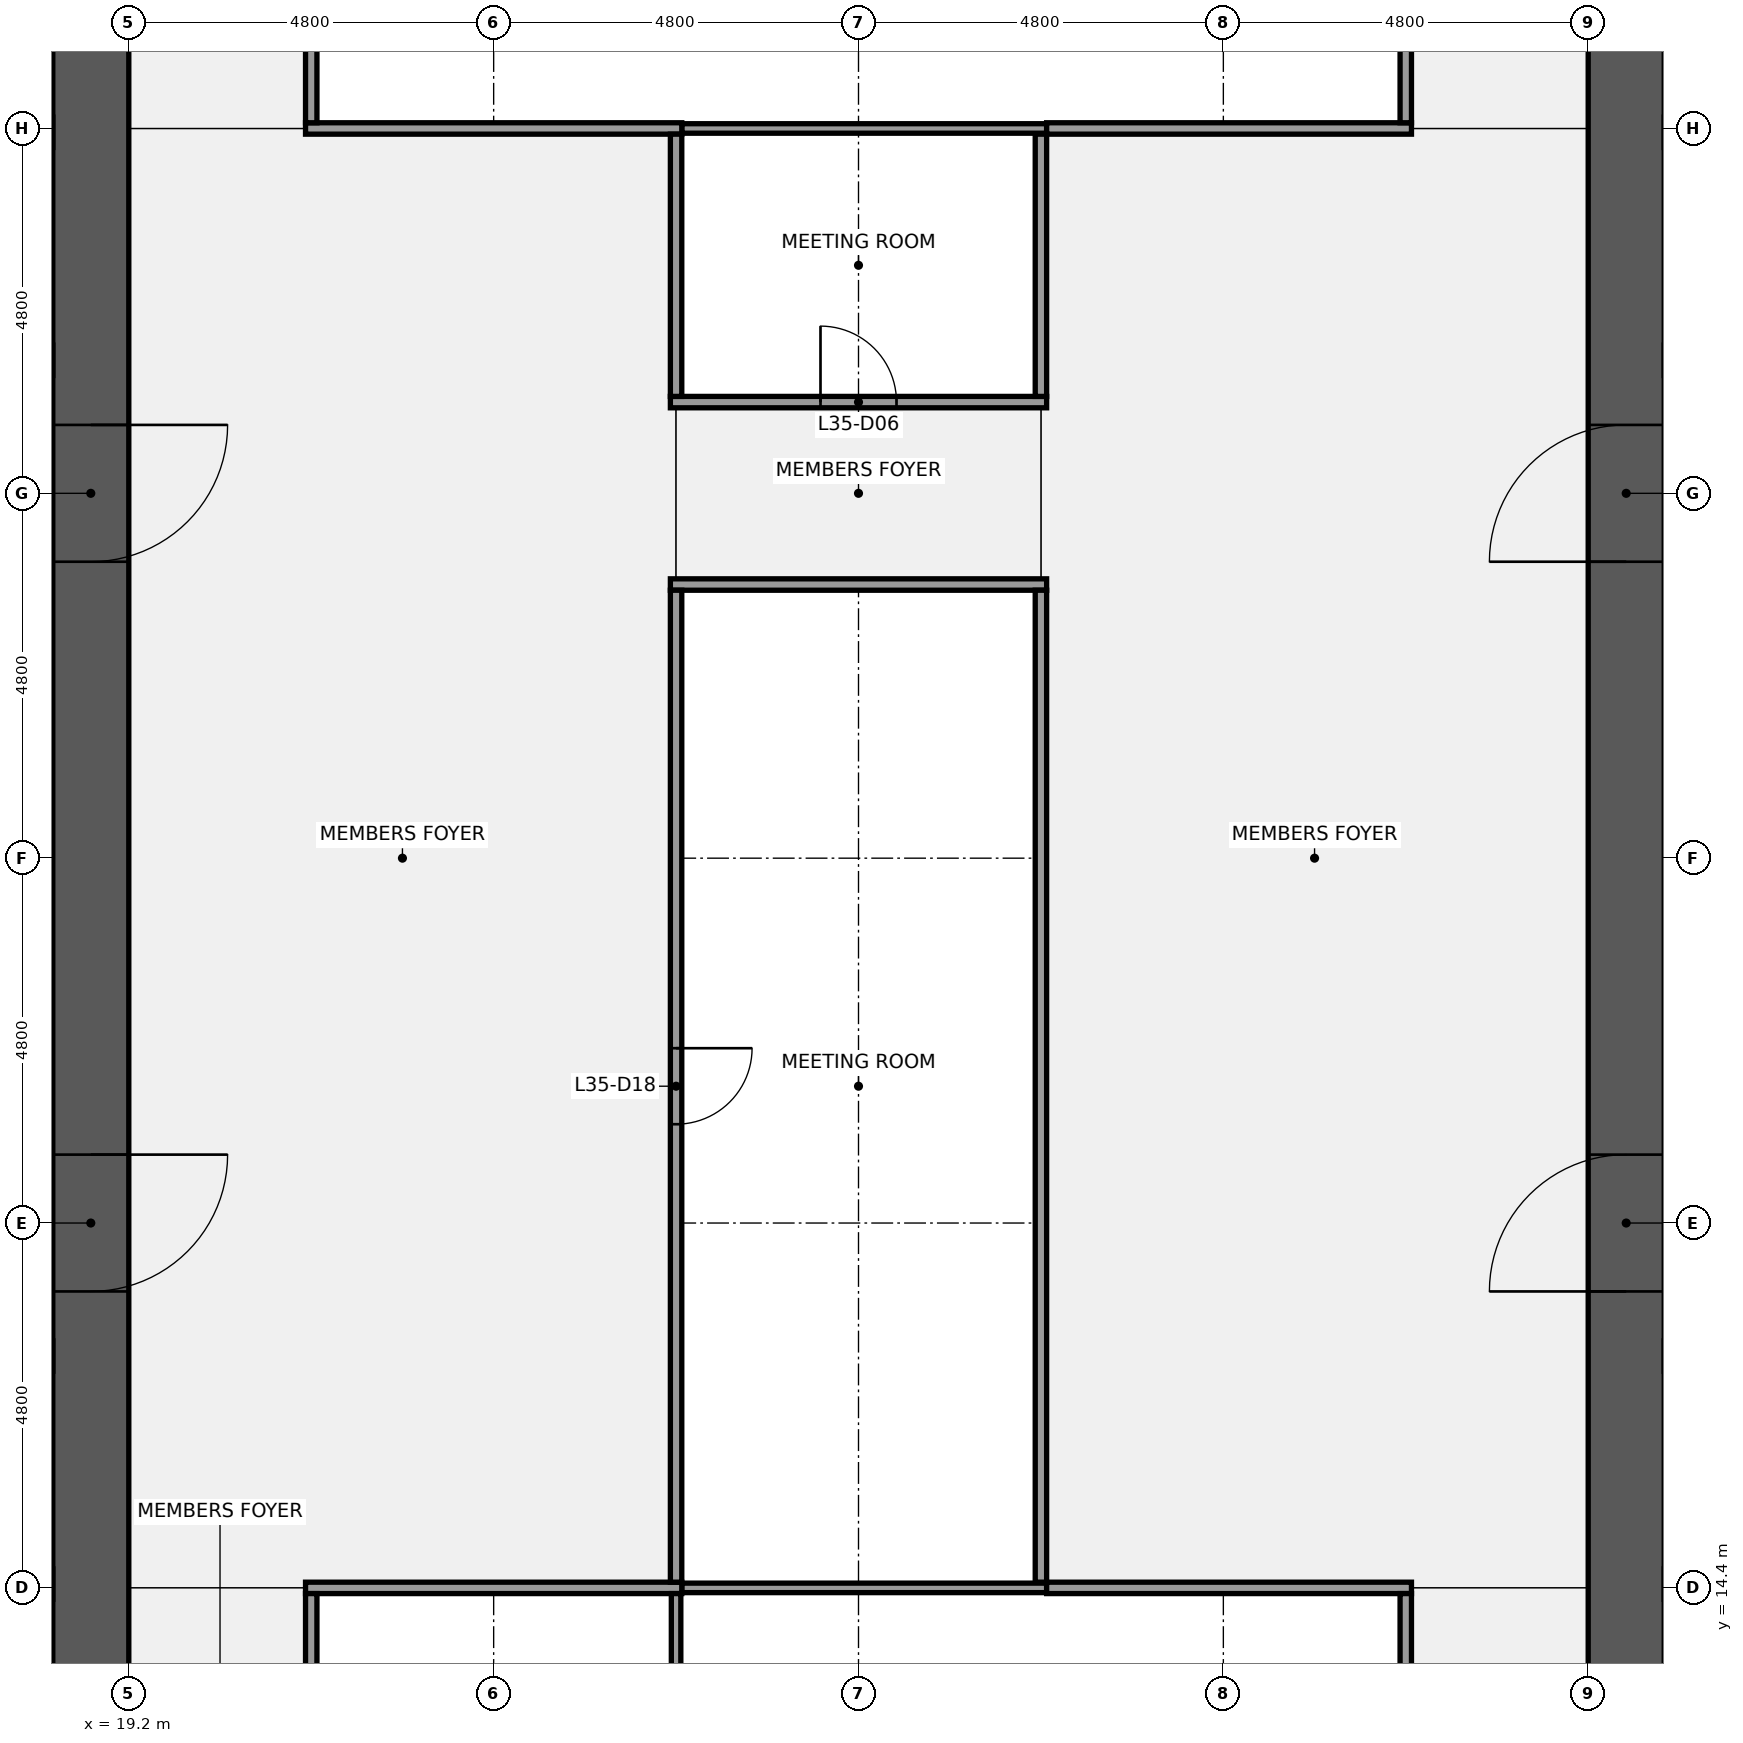
"""IFC4 building model, lengths in metres.
Left out: names, types, materials, properties, quantities, classifications, styles, units other than length and angle.
Written with IfcOpenShell. Run it as: python <this file> out.ifc"""

import sys

from ifc_helpers import new_model, si_unit, direction, frame, frame_2d, origin, place, context, subcontext, project, spatial, rectangle, extrude, element, fill, save


model = new_model("IFC4")
c1 = context("Model", 3, precision=1e-05, world=origin(), true_north=direction((0.0, 1.0)))
c2 = subcontext(c1, "Body", "Model", "MODEL_VIEW")
j1 = project(units=[si_unit("LENGTHUNIT", "METRE"), si_unit("PLANEANGLEUNIT", "RADIAN")], contexts=[c1])
p1 = place(None, origin())
s1 = spatial("IfcSite", under=j1, at=p1, CompositionType="ELEMENT")
p2 = place(p1, origin())
s2 = spatial("IfcBuilding", under=s1, at=p2, CompositionType="ELEMENT")
p3 = place(p2, frame((0.0, 0.0, 160.1)))
s3 = spatial("IfcBuildingStorey", under=s2, at=p3, CompositionType="ELEMENT", Elevation=160.1)
p4 = place(p3, frame((18.7, 38.4, 0.0), z_axis=(0.0, 0.0, 1.0), x_axis=(0.0, -1.0, 0.0)))
e1 = element("IfcWall", 1, at=p4, inside=s3, PredefinedType="SHEAR", context=c2, shape_type="SweptSolid", body=[
    extrude(rectangle(XDim=28.8, YDim=1.0, at=frame_2d((14.4, 0.0))), origin(), (0.0, 0.0, 1.0), 3.84),
])
p5 = place(p4, frame((18.3, 0.0, 0.0)))
e2 = element("IfcOpeningElement", 2, at=p5, cuts=e1, PredefinedType="OPENING", context=c2, shape_type="SweptSolid", body=[
    extrude(rectangle(XDim=1.8, YDim=2.1, at=frame_2d((0.9, 1.05))), frame((0.0, 0.51, 0.0), z_axis=(0.0, -1.0, 0.0), x_axis=(1.0, 0.0, 0.0)), (0.0, 0.0, 1.0), 1.02),
])
p6 = place(p4, frame((8.7, 0.0, 0.0)))
e3 = element("IfcOpeningElement", 3, at=p6, cuts=e1, PredefinedType="OPENING", context=c2, shape_type="SweptSolid", body=[
    extrude(rectangle(XDim=1.8, YDim=2.1, at=frame_2d((0.9, 1.05))), frame((0.0, 0.51, 0.0), z_axis=(0.0, -1.0, 0.0), x_axis=(1.0, 0.0, 0.0)), (0.0, 0.0, 1.0), 1.02),
])
p7 = place(p3, frame((1.0, 14.45, 0.0), z_axis=(0.0, 0.0, 1.0), x_axis=(1.0, 0.0, 0.0)))
e4 = element("IfcWall", 4, at=p7, inside=s3, PredefinedType="SHEAR", context=c2, shape_type="SweptSolid", body=[
    extrude(rectangle(XDim=17.2, YDim=0.4, at=frame_2d((8.6, 0.0))), origin(), (0.0, 0.0, 1.0), 3.84),
])
p8 = place(p3, frame((1.0, 17.45, 0.0), z_axis=(0.0, 0.0, 1.0), x_axis=(1.0, 0.0, 0.0)))
e5 = element("IfcWall", 5, at=p8, inside=s3, PredefinedType="SHEAR", context=c2, shape_type="SweptSolid", body=[
    extrude(rectangle(XDim=17.2, YDim=0.4, at=frame_2d((8.6, 0.0))), origin(), (0.0, 0.0, 1.0), 3.84),
])
p9 = place(p8, frame((0.762, 0.0, 0.0)))
e6 = element("IfcOpeningElement", 6, at=p9, cuts=e5, PredefinedType="OPENING", context=c2, shape_type="SweptSolid", body=[
    extrude(rectangle(XDim=1.0, YDim=2.1, at=frame_2d((0.5, 1.05))), frame((0.0, 0.21, 0.0), z_axis=(0.0, -1.0, 0.0), x_axis=(1.0, 0.0, 0.0)), (0.0, 0.0, 1.0), 0.42),
])
p10 = place(p8, frame((3.6, 0.0, 0.0)))
e7 = element("IfcOpeningElement", 7, at=p10, cuts=e5, PredefinedType="OPENING", context=c2, shape_type="SweptSolid", body=[
    extrude(rectangle(XDim=1.0, YDim=2.1, at=frame_2d((0.5, 1.05))), frame((0.0, 0.21, 0.0), z_axis=(0.0, -1.0, 0.0), x_axis=(1.0, 0.0, 0.0)), (0.0, 0.0, 1.0), 0.42),
])
p11 = place(p8, frame((6.6, 0.0, 0.0)))
e8 = element("IfcOpeningElement", 8, at=p11, cuts=e5, PredefinedType="OPENING", context=c2, shape_type="SweptSolid", body=[
    extrude(rectangle(XDim=1.0, YDim=2.1, at=frame_2d((0.5, 1.05))), frame((0.0, 0.21, 0.0), z_axis=(0.0, -1.0, 0.0), x_axis=(1.0, 0.0, 0.0)), (0.0, 0.0, 1.0), 0.42),
])
p12 = place(p8, frame((11.1, 0.0, 0.0)))
e9 = element("IfcOpeningElement", 9, at=p12, cuts=e5, PredefinedType="OPENING", context=c2, shape_type="SweptSolid", body=[
    extrude(rectangle(XDim=1.0, YDim=2.1, at=frame_2d((0.5, 1.05))), frame((0.0, 0.21, 0.0), z_axis=(0.0, -1.0, 0.0), x_axis=(1.0, 0.0, 0.0)), (0.0, 0.0, 1.0), 0.42),
])
p13 = place(p8, frame((15.438, 0.0, 0.0)))
e10 = element("IfcOpeningElement", 10, at=p13, cuts=e5, PredefinedType="OPENING", context=c2, shape_type="SweptSolid", body=[
    extrude(rectangle(XDim=1.0, YDim=2.1, at=frame_2d((0.5, 1.05))), frame((0.0, 0.21, 0.0), z_axis=(0.0, -1.0, 0.0), x_axis=(1.0, 0.0, 0.0)), (0.0, 0.0, 1.0), 0.42),
])
p14 = place(p3, frame((1.0, 30.55, 0.0), z_axis=(0.0, 0.0, 1.0), x_axis=(1.0, 0.0, 0.0)))
e11 = element("IfcWall", 11, at=p14, inside=s3, PredefinedType="SHEAR", context=c2, shape_type="SweptSolid", body=[
    extrude(rectangle(XDim=17.2, YDim=0.4, at=frame_2d((8.6, 0.0))), origin(), (0.0, 0.0, 1.0), 3.84),
])
p15 = place(p14, frame((0.762, 0.0, 0.0)))
e12 = element("IfcOpeningElement", 12, at=p15, cuts=e11, PredefinedType="OPENING", context=c2, shape_type="SweptSolid", body=[
    extrude(rectangle(XDim=1.0, YDim=2.1, at=frame_2d((0.5, 1.05))), frame((0.0, 0.21, 0.0), z_axis=(0.0, -1.0, 0.0), x_axis=(1.0, 0.0, 0.0)), (0.0, 0.0, 1.0), 0.42),
])
p16 = place(p14, frame((4.2, 0.0, 0.0)))
e13 = element("IfcOpeningElement", 13, at=p16, cuts=e11, PredefinedType="OPENING", context=c2, shape_type="SweptSolid", body=[
    extrude(rectangle(XDim=1.0, YDim=2.1, at=frame_2d((0.5, 1.05))), frame((0.0, 0.21, 0.0), z_axis=(0.0, -1.0, 0.0), x_axis=(1.0, 0.0, 0.0)), (0.0, 0.0, 1.0), 0.42),
])
p17 = place(p14, frame((8.4, 0.0, 0.0)))
e14 = element("IfcOpeningElement", 14, at=p17, cuts=e11, PredefinedType="OPENING", context=c2, shape_type="SweptSolid", body=[
    extrude(rectangle(XDim=1.0, YDim=2.1, at=frame_2d((0.5, 1.05))), frame((0.0, 0.21, 0.0), z_axis=(0.0, -1.0, 0.0), x_axis=(1.0, 0.0, 0.0)), (0.0, 0.0, 1.0), 0.42),
])
p18 = place(p14, frame((13.637, 0.0, 0.0)))
e15 = element("IfcOpeningElement", 15, at=p18, cuts=e11, PredefinedType="OPENING", context=c2, shape_type="SweptSolid", body=[
    extrude(rectangle(XDim=1.0, YDim=2.1, at=frame_2d((0.5, 1.05))), frame((0.0, 0.21, 0.0), z_axis=(0.0, -1.0, 0.0), x_axis=(1.0, 0.0, 0.0)), (0.0, 0.0, 1.0), 0.42),
])
p19 = place(p3, frame((1.0, 33.55, 0.0), z_axis=(0.0, 0.0, 1.0), x_axis=(1.0, 0.0, 0.0)))
e16 = element("IfcWall", 16, at=p19, inside=s3, PredefinedType="SHEAR", context=c2, shape_type="SweptSolid", body=[
    extrude(rectangle(XDim=17.2, YDim=0.4, at=frame_2d((8.6, 0.0))), origin(), (0.0, 0.0, 1.0), 3.84),
])
p20 = place(p3, frame((38.9, 9.6, 0.0), z_axis=(0.0, 0.0, 1.0), x_axis=(0.0, 1.0, 0.0)))
e17 = element("IfcWall", 17, at=p20, inside=s3, PredefinedType="SHEAR", context=c2, shape_type="SweptSolid", body=[
    extrude(rectangle(XDim=28.8, YDim=1.0, at=frame_2d((14.4, 0.0))), origin(), (0.0, 0.0, 1.0), 3.84),
])
p21 = place(p20, frame((8.7, 0.0, 0.0)))
e18 = element("IfcOpeningElement", 18, at=p21, cuts=e17, PredefinedType="OPENING", context=c2, shape_type="SweptSolid", body=[
    extrude(rectangle(XDim=1.8, YDim=2.1, at=frame_2d((0.9, 1.05))), frame((0.0, 0.51, 0.0), z_axis=(0.0, -1.0, 0.0), x_axis=(1.0, 0.0, 0.0)), (0.0, 0.0, 1.0), 1.02),
])
p22 = place(p20, frame((18.3, 0.0, 0.0)))
e19 = element("IfcOpeningElement", 19, at=p22, cuts=e17, PredefinedType="OPENING", context=c2, shape_type="SweptSolid", body=[
    extrude(rectangle(XDim=1.8, YDim=2.1, at=frame_2d((0.9, 1.05))), frame((0.0, 0.51, 0.0), z_axis=(0.0, -1.0, 0.0), x_axis=(1.0, 0.0, 0.0)), (0.0, 0.0, 1.0), 1.02),
])
p23 = place(p3, frame((26.475, 14.4, 0.0), z_axis=(0.0, 0.0, 1.0), x_axis=(1.0, 0.0, 0.0)))
e20 = element("IfcWall", 20, at=p23, inside=s3, PredefinedType="PARTITIONING", context=c2, shape_type="SweptSolid", body=[
    extrude(rectangle(XDim=4.8, YDim=0.125, at=frame_2d((2.4, 0.0))), origin(), (0.0, 0.0, 1.0), 2.849),
])
p24 = place(p3, frame((21.525, 14.4, 0.0), z_axis=(0.0, 0.0, 1.0), x_axis=(1.0, 0.0, 0.0)))
e21 = element("IfcWall", 21, at=p24, inside=s3, PredefinedType="PARTITIONING", context=c2, shape_type="SweptSolid", body=[
    extrude(rectangle(XDim=4.95, YDim=0.15, at=frame_2d((2.475, 0.0))), origin(), (0.0, 0.0, 1.0), 2.849),
])
p25 = place(p3, frame((31.275, 14.4, 0.0), z_axis=(0.0, 0.0, 1.0), x_axis=(1.0, 0.0, 0.0)))
e22 = element("IfcWall", 22, at=p25, inside=s3, PredefinedType="PARTITIONING", context=c2, shape_type="SweptSolid", body=[
    extrude(rectangle(XDim=4.8, YDim=0.15, at=frame_2d((2.4, 0.0))), origin(), (0.0, 0.0, 1.0), 2.849),
])
p26 = place(p3, frame((26.325, 27.6, 0.0), z_axis=(0.0, 0.0, 1.0), x_axis=(1.0, 0.0, 0.0)))
e23 = element("IfcWall", 23, at=p26, inside=s3, PredefinedType="PARTITIONING", context=c2, shape_type="SweptSolid", body=[
    extrude(rectangle(XDim=4.95, YDim=0.15, at=frame_2d((2.475, 0.0))), origin(), (0.0, 0.0, 1.0), 2.849),
])
p27 = place(p3, frame((26.325, 30.0, 0.0), z_axis=(0.0, 0.0, 1.0), x_axis=(1.0, 0.0, 0.0)))
e24 = element("IfcWall", 24, at=p27, inside=s3, PredefinedType="PARTITIONING", context=c2, shape_type="SweptSolid", body=[
    extrude(rectangle(XDim=4.95, YDim=0.15, at=frame_2d((2.475, 0.0))), origin(), (0.0, 0.0, 1.0), 2.849),
])
p28 = place(p27, frame((1.975, 0.0, 0.0)))
e25 = element("IfcOpeningElement", 25, at=p28, cuts=e24, PredefinedType="OPENING", context=c2, shape_type="SweptSolid", body=[
    extrude(rectangle(XDim=1.0, YDim=2.1, at=frame_2d((0.5, 1.05))), frame((0.0, 0.085, 0.0), z_axis=(0.0, -1.0, 0.0), x_axis=(1.0, 0.0, 0.0)), (0.0, 0.0, 1.0), 0.17),
])
p29 = place(p3, frame((26.475, 33.6, 0.0), z_axis=(0.0, 0.0, 1.0), x_axis=(1.0, 0.0, 0.0)))
e26 = element("IfcWall", 26, at=p29, inside=s3, PredefinedType="PARTITIONING", context=c2, shape_type="SweptSolid", body=[
    extrude(rectangle(XDim=4.8, YDim=0.125, at=frame_2d((2.4, 0.0))), origin(), (0.0, 0.0, 1.0), 2.849),
])
p30 = place(p3, frame((21.525, 33.6, 0.0), z_axis=(0.0, 0.0, 1.0), x_axis=(1.0, 0.0, 0.0)))
e27 = element("IfcWall", 27, at=p30, inside=s3, PredefinedType="PARTITIONING", context=c2, shape_type="SweptSolid", body=[
    extrude(rectangle(XDim=4.95, YDim=0.15, at=frame_2d((2.475, 0.0))), origin(), (0.0, 0.0, 1.0), 2.849),
])
p31 = place(p3, frame((31.275, 33.6, 0.0), z_axis=(0.0, 0.0, 1.0), x_axis=(1.0, 0.0, 0.0)))
e28 = element("IfcWall", 28, at=p31, inside=s3, PredefinedType="PARTITIONING", context=c2, shape_type="SweptSolid", body=[
    extrude(rectangle(XDim=4.8, YDim=0.15, at=frame_2d((2.4, 0.0))), origin(), (0.0, 0.0, 1.0), 2.849),
])
p32 = place(p3, frame((21.6, 9.675, 0.0), z_axis=(0.0, 0.0, 1.0), x_axis=(0.0, 1.0, 0.0)))
e29 = element("IfcWall", 29, at=p32, inside=s3, PredefinedType="PARTITIONING", context=c2, shape_type="SweptSolid", body=[
    extrude(rectangle(XDim=4.65, YDim=0.15, at=frame_2d((2.325, 0.0))), origin(), (0.0, 0.0, 1.0), 2.849),
])
p33 = place(p32, frame((1.825, 0.0, 0.0)))
e30 = element("IfcOpeningElement", 30, at=p33, cuts=e29, PredefinedType="OPENING", context=c2, shape_type="SweptSolid", body=[
    extrude(rectangle(XDim=1.0, YDim=2.1, at=frame_2d((0.5, 1.05))), frame((0.0, 0.085, 0.0), z_axis=(0.0, -1.0, 0.0), x_axis=(1.0, 0.0, 0.0)), (0.0, 0.0, 1.0), 0.17),
])
p34 = place(p3, frame((21.6, 33.675, 0.0), z_axis=(0.0, 0.0, 1.0), x_axis=(0.0, 1.0, 0.0)))
e31 = element("IfcWall", 31, at=p34, inside=s3, PredefinedType="PARTITIONING", context=c2, shape_type="SweptSolid", body=[
    extrude(rectangle(XDim=4.65, YDim=0.15, at=frame_2d((2.325, 0.0))), origin(), (0.0, 0.0, 1.0), 2.849),
])
p35 = place(p3, frame((26.4, 9.675, 0.0), z_axis=(0.0, 0.0, 1.0), x_axis=(0.0, 1.0, 0.0)))
e32 = element("IfcWall", 32, at=p35, inside=s3, PredefinedType="PARTITIONING", context=c2, shape_type="SweptSolid", body=[
    extrude(rectangle(XDim=4.65, YDim=0.125, at=frame_2d((2.325, 0.0))), origin(), (0.0, 0.0, 1.0), 2.849),
])
p36 = place(p3, frame((26.4, 14.475, 0.0), z_axis=(0.0, 0.0, 1.0), x_axis=(0.0, 1.0, 0.0)))
e33 = element("IfcWall", 33, at=p36, inside=s3, PredefinedType="PARTITIONING", context=c2, shape_type="SweptSolid", body=[
    extrude(rectangle(XDim=13.05, YDim=0.15, at=frame_2d((6.525, 0.0))), origin(), (0.0, 0.0, 1.0), 2.849),
])
p37 = place(p36, frame((6.025, 0.0, 0.0)))
e34 = element("IfcOpeningElement", 34, at=p37, cuts=e33, PredefinedType="OPENING", context=c2, shape_type="SweptSolid", body=[
    extrude(rectangle(XDim=1.0, YDim=2.1, at=frame_2d((0.5, 1.05))), frame((0.0, 0.085, 0.0), z_axis=(0.0, -1.0, 0.0), x_axis=(1.0, 0.0, 0.0)), (0.0, 0.0, 1.0), 0.17),
])
p38 = place(p3, frame((26.4, 30.075, 0.0), z_axis=(0.0, 0.0, 1.0), x_axis=(0.0, 1.0, 0.0)))
e35 = element("IfcWall", 35, at=p38, inside=s3, PredefinedType="PARTITIONING", context=c2, shape_type="SweptSolid", body=[
    extrude(rectangle(XDim=3.45, YDim=0.15, at=frame_2d((1.725, 0.0))), origin(), (0.0, 0.0, 1.0), 2.849),
])
p39 = place(p3, frame((31.2, 14.475, 0.0), z_axis=(0.0, 0.0, 1.0), x_axis=(0.0, 1.0, 0.0)))
e36 = element("IfcWall", 36, at=p39, inside=s3, PredefinedType="PARTITIONING", context=c2, shape_type="SweptSolid", body=[
    extrude(rectangle(XDim=13.05, YDim=0.15, at=frame_2d((6.525, 0.0))), origin(), (0.0, 0.0, 1.0), 2.849),
])
p40 = place(p3, frame((31.2, 30.075, 0.0), z_axis=(0.0, 0.0, 1.0), x_axis=(0.0, 1.0, 0.0)))
e37 = element("IfcWall", 37, at=p40, inside=s3, PredefinedType="PARTITIONING", context=c2, shape_type="SweptSolid", body=[
    extrude(rectangle(XDim=3.45, YDim=0.15, at=frame_2d((1.725, 0.0))), origin(), (0.0, 0.0, 1.0), 2.849),
])
for number, where, z_axis, x_axis in (
    (38, (36.0, 9.675, 0.0), (0.0, 0.0, 1.0), (0.0, 1.0, 0.0)),
    (39, (36.0, 33.675, 0.0), (0.0, 0.0, 1.0), (0.0, 1.0, 0.0)),
):
    element("IfcWall", number, at=place(p3, frame(where, z_axis=z_axis, x_axis=x_axis)), inside=s3, PredefinedType="PARTITIONING", context=c2, shape_type="SweptSolid", body=[
        extrude(rectangle(XDim=4.65, YDim=0.15, at=frame_2d((2.325, 0.0))), origin(), (0.0, 0.0, 1.0), 2.849),
    ])
p41 = place(p5, origin())
e40 = element("IfcDoor", 40, at=p41, inside=s3, OperationType="DOUBLE_DOOR_SINGLE_SWING", PredefinedType="DOOR", context=c2, shape_type="SweptSolid", body=[
    extrude(rectangle(XDim=1.8, YDim=2.1, at=frame_2d((0.9, 1.05))), frame((0.0, 0.025, 0.0), z_axis=(0.0, -1.0, 0.0), x_axis=(1.0, 0.0, 0.0)), (0.0, 0.0, 1.0), 0.05),
])
fill(e2, e40)
p42 = place(p6, origin())
e41 = element("IfcDoor", 41, at=p42, inside=s3, OperationType="DOUBLE_DOOR_SINGLE_SWING", PredefinedType="DOOR", context=c2, shape_type="SweptSolid", body=[
    extrude(rectangle(XDim=1.8, YDim=2.1, at=frame_2d((0.9, 1.05))), frame((0.0, 0.025, 0.0), z_axis=(0.0, -1.0, 0.0), x_axis=(1.0, 0.0, 0.0)), (0.0, 0.0, 1.0), 0.05),
])
fill(e3, e41)
p43 = place(p21, origin())
e42 = element("IfcDoor", 42, at=p43, inside=s3, OperationType="DOUBLE_DOOR_SINGLE_SWING", PredefinedType="DOOR", context=c2, shape_type="SweptSolid", body=[
    extrude(rectangle(XDim=1.8, YDim=2.1, at=frame_2d((0.9, 1.05))), frame((0.0, 0.025, 0.0), z_axis=(0.0, -1.0, 0.0), x_axis=(1.0, 0.0, 0.0)), (0.0, 0.0, 1.0), 0.05),
])
fill(e18, e42)
p44 = place(p22, origin())
e43 = element("IfcDoor", 43, at=p44, inside=s3, OperationType="DOUBLE_DOOR_SINGLE_SWING", PredefinedType="DOOR", context=c2, shape_type="SweptSolid", body=[
    extrude(rectangle(XDim=1.8, YDim=2.1, at=frame_2d((0.9, 1.05))), frame((0.0, 0.025, 0.0), z_axis=(0.0, -1.0, 0.0), x_axis=(1.0, 0.0, 0.0)), (0.0, 0.0, 1.0), 0.05),
])
fill(e19, e43)
p45 = place(p28, origin())
e44 = element("IfcDoor", 44, at=p45, inside=s3, OperationType="SINGLE_SWING_LEFT", PredefinedType="DOOR", context=c2, shape_type="SweptSolid", body=[
    extrude(rectangle(XDim=1.0, YDim=2.1, at=frame_2d((0.5, 1.05))), frame((0.0, 0.025, 0.0), z_axis=(0.0, -1.0, 0.0), x_axis=(1.0, 0.0, 0.0)), (0.0, 0.0, 1.0), 0.05),
])
fill(e25, e44)
p46 = place(p37, origin())
e45 = element("IfcDoor", 45, at=p46, inside=s3, OperationType="SINGLE_SWING_RIGHT", PredefinedType="DOOR", context=c2, shape_type="SweptSolid", body=[
    extrude(rectangle(XDim=1.0, YDim=2.1, at=frame_2d((0.5, 1.05))), frame((0.0, 0.025, 0.0), z_axis=(0.0, -1.0, 0.0), x_axis=(1.0, 0.0, 0.0)), (0.0, 0.0, 1.0), 0.05),
])
fill(e34, e45)
save(model, sys.argv[1])
